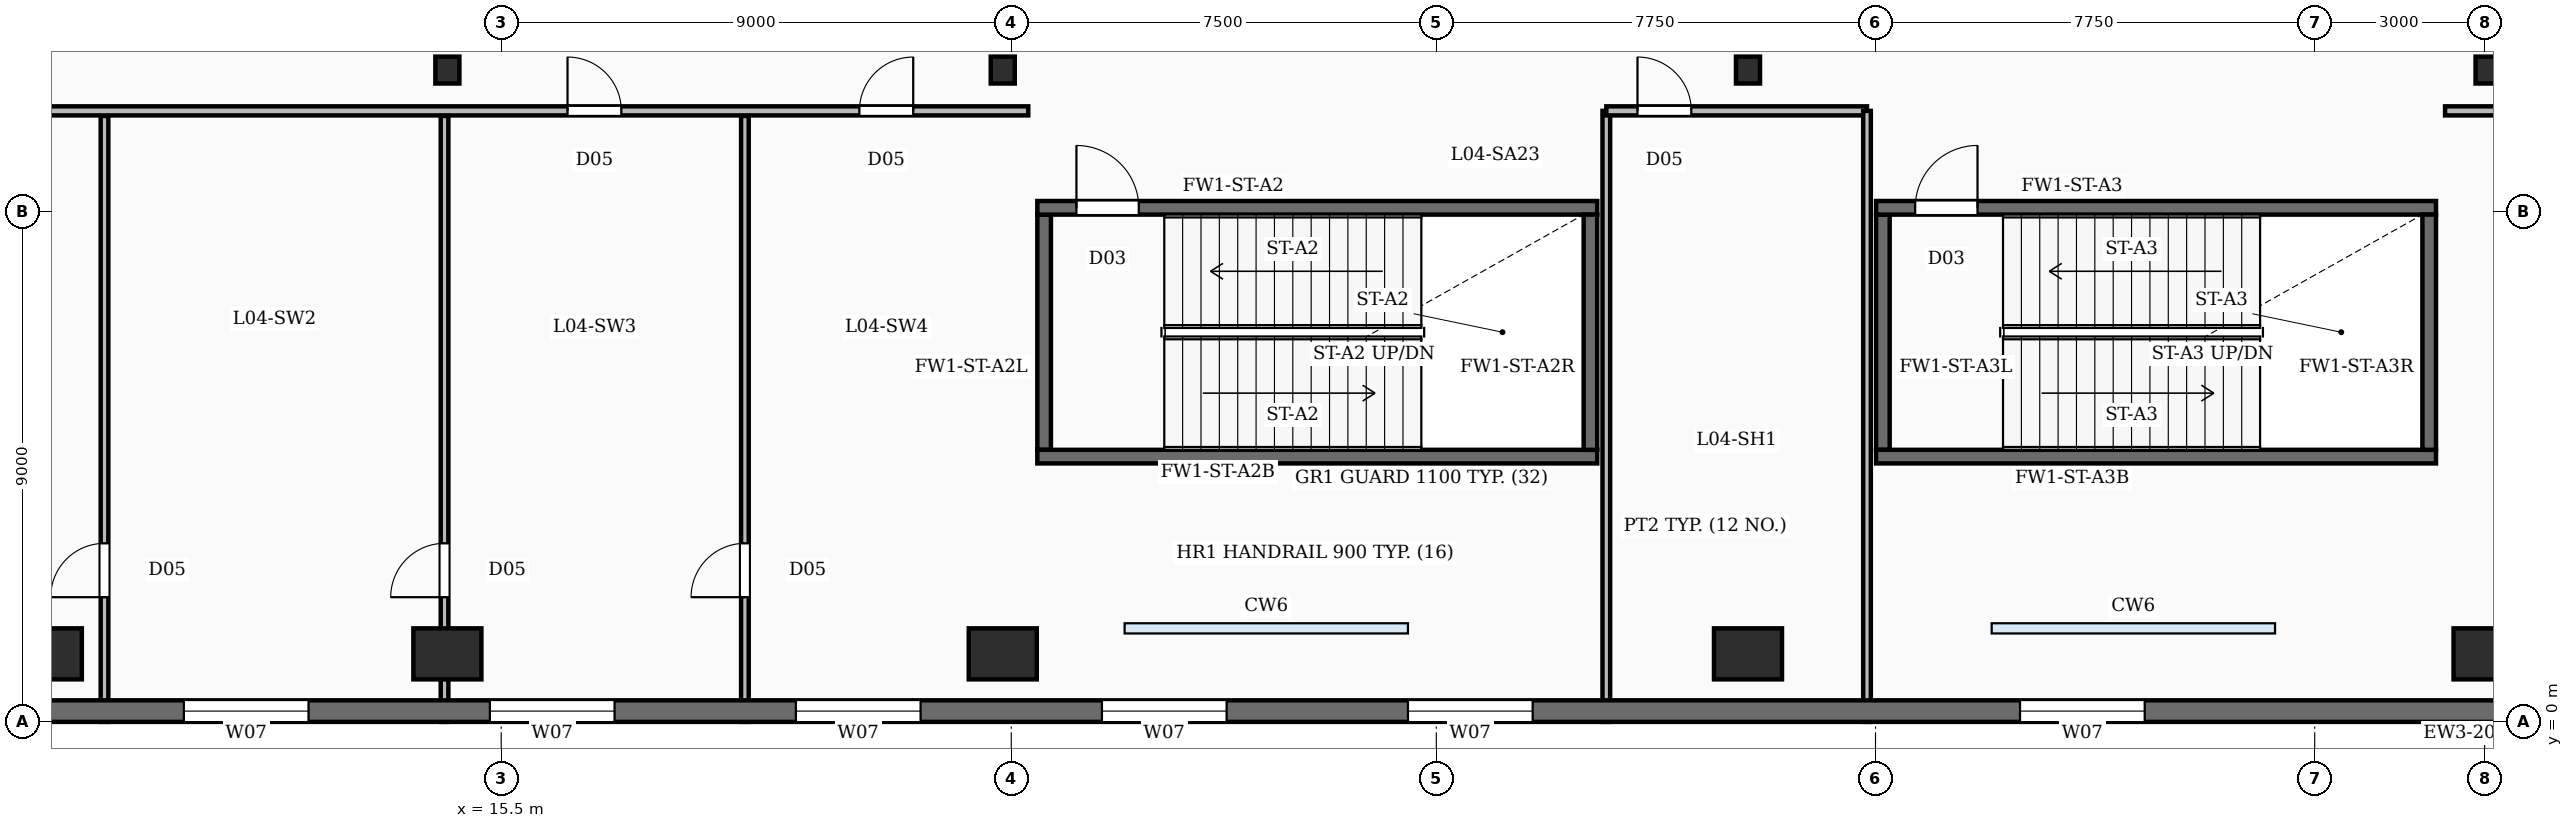
"""IFC4 building model, lengths in metres.
Left out: names, types, materials, properties, quantities, classifications, styles, units other than length and angle.
Written with IfcOpenShell. Run it as: python <this file> out.ifc"""

import sys

from ifc_helpers import new_model, si_unit, direction, frame, frame_2d, origin, origin_2d, place, context, subcontext, project, spatial, rectangle, i_section, extrude, element, fill, save


model = new_model("IFC4")
c1 = context("Model", 3, precision=1e-05, world=origin(), true_north=direction((0.0, 1.0)))
c2 = subcontext(c1, "Body", "Model", "MODEL_VIEW")
j1 = project(units=[si_unit("LENGTHUNIT", "METRE"), si_unit("PLANEANGLEUNIT", "RADIAN")], contexts=[c1])
p1 = place(None, origin())
s1 = spatial("IfcSite", under=j1, at=p1, CompositionType="ELEMENT")
p2 = place(p1, origin())
s2 = spatial("IfcBuilding", under=s1, at=p2, CompositionType="ELEMENT")
p3 = place(p2, frame((0.0, 0.0, 23.0)))
s3 = spatial("IfcBuildingStorey", under=s2, at=p3, CompositionType="ELEMENT", Elevation=23.0)
for number, where, z_axis, x_axis in (
    (1, (7.5, 1.2, -0.35), (0.0, 0.0, 1.0), (1.0, 0.0, 0.0)),
    (2, (14.55, 1.2, -0.35), (0.0, 0.0, 1.0), (1.0, 0.0, 0.0)),
    (3, (24.35, 1.2, -0.35), (0.0, 0.0, 1.0), (1.0, 0.0, 0.0)),
    (4, (37.5, 1.2, -0.35), (0.0, 0.0, 1.0), (1.0, 0.0, 0.0)),
    (5, (50.55, 1.2, -0.35), (0.0, 0.0, 1.0), (1.0, 0.0, 0.0)),
):
    element("IfcColumn", number, at=place(p3, frame(where, z_axis=z_axis, x_axis=x_axis)), inside=s3, PredefinedType="COLUMN", context=c2, shape_type="SweptSolid", body=[
        extrude(rectangle(XDim=1.2, YDim=0.9, at=origin_2d()), origin(), (0.0, 0.0, 1.0), 5.0),
    ])
for number, where, z_axis, x_axis in (
    (6, (14.55, 11.5, -0.35), (0.0, 0.0, 1.0), (1.0, 0.0, 0.0)),
    (7, (24.35, 11.5, -0.35), (0.0, 0.0, 1.0), (1.0, 0.0, 0.0)),
    (8, (37.5, 11.5, -0.35), (0.0, 0.0, 1.0), (1.0, 0.0, 0.0)),
    (9, (50.55, 11.5, -0.35), (0.0, 0.0, 1.0), (1.0, 0.0, 0.0)),
):
    element("IfcColumn", number, at=place(p3, frame(where, z_axis=z_axis, x_axis=x_axis)), inside=s3, PredefinedType="COLUMN", context=c2, shape_type="SweptSolid", body=[
        extrude(i_section(OverallWidth=0.424, OverallDepth=0.474, WebThickness=0.048, FlangeThickness=0.077, FilletRadius=0.02, at=origin_2d()), origin(), (0.0, 0.0, 1.0), 5.0),
    ])
p4 = place(p3, frame((74.1, 0.19, 0.0), z_axis=(0.0, 0.0, 1.0), x_axis=(-1.0, 0.0, 0.0)))
e10 = element("IfcWall", 10, at=p4, inside=s3, PredefinedType="SOLIDWALL", context=c2, shape_type="SweptSolid", body=[
    extrude(rectangle(XDim=68.7, YDim=0.38, at=frame_2d((34.35, 0.0))), origin(), (0.0, 0.0, 1.0), 4.65),
])
p5 = place(p4, frame((2.6, 0.0, 0.95)))
e11 = element("IfcOpeningElement", 11, at=p5, cuts=e10, PredefinedType="OPENING", context=c2, shape_type="SweptSolid", body=[
    extrude(rectangle(XDim=2.2, YDim=2.5, at=frame_2d((1.1, 1.25))), frame((0.0, 0.2, 0.0), z_axis=(0.0, -1.0, 0.0), x_axis=(1.0, 0.0, 0.0)), (0.0, 0.0, 1.0), 0.4),
])
p6 = place(p4, frame((29.6, 0.0, 0.95)))
e12 = element("IfcOpeningElement", 12, at=p6, cuts=e10, PredefinedType="OPENING", context=c2, shape_type="SweptSolid", body=[
    extrude(rectangle(XDim=2.2, YDim=2.5, at=frame_2d((1.1, 1.25))), frame((0.0, 0.2, 0.0), z_axis=(0.0, -1.0, 0.0), x_axis=(1.0, 0.0, 0.0)), (0.0, 0.0, 1.0), 0.4),
])
p7 = place(p4, frame((40.4, 0.0, 0.95)))
e13 = element("IfcOpeningElement", 13, at=p7, cuts=e10, PredefinedType="OPENING", context=c2, shape_type="SweptSolid", body=[
    extrude(rectangle(XDim=2.2, YDim=2.5, at=frame_2d((1.1, 1.25))), frame((0.0, 0.2, 0.0), z_axis=(0.0, -1.0, 0.0), x_axis=(1.0, 0.0, 0.0)), (0.0, 0.0, 1.0), 0.4),
])
p8 = place(p4, frame((45.8, 0.0, 0.95)))
e14 = element("IfcOpeningElement", 14, at=p8, cuts=e10, PredefinedType="OPENING", context=c2, shape_type="SweptSolid", body=[
    extrude(rectangle(XDim=2.2, YDim=2.5, at=frame_2d((1.1, 1.25))), frame((0.0, 0.2, 0.0), z_axis=(0.0, -1.0, 0.0), x_axis=(1.0, 0.0, 0.0)), (0.0, 0.0, 1.0), 0.4),
])
p9 = place(p4, frame((51.2, 0.0, 0.95)))
e15 = element("IfcOpeningElement", 15, at=p9, cuts=e10, PredefinedType="OPENING", context=c2, shape_type="SweptSolid", body=[
    extrude(rectangle(XDim=2.2, YDim=2.5, at=frame_2d((1.1, 1.25))), frame((0.0, 0.2, 0.0), z_axis=(0.0, -1.0, 0.0), x_axis=(1.0, 0.0, 0.0)), (0.0, 0.0, 1.0), 0.4),
])
p10 = place(p4, frame((56.6, 0.0, 0.95)))
e16 = element("IfcOpeningElement", 16, at=p10, cuts=e10, PredefinedType="OPENING", context=c2, shape_type="SweptSolid", body=[
    extrude(rectangle(XDim=2.2, YDim=2.5, at=frame_2d((1.1, 1.25))), frame((0.0, 0.2, 0.0), z_axis=(0.0, -1.0, 0.0), x_axis=(1.0, 0.0, 0.0)), (0.0, 0.0, 1.0), 0.4),
])
p11 = place(p4, frame((62.0, 0.0, 0.95)))
e17 = element("IfcOpeningElement", 17, at=p11, cuts=e10, PredefinedType="OPENING", context=c2, shape_type="SweptSolid", body=[
    extrude(rectangle(XDim=2.2, YDim=2.5, at=frame_2d((1.1, 1.25))), frame((0.0, 0.2, 0.0), z_axis=(0.0, -1.0, 0.0), x_axis=(1.0, 0.0, 0.0)), (0.0, 0.0, 1.0), 0.4),
])
p12 = place(p3, frame((24.96, 9.07, 0.0), z_axis=(0.0, 0.0, 1.0), x_axis=(1.0, 0.0, 0.0)))
e18 = element("IfcWall", 18, at=p12, inside=s3, PredefinedType="SOLIDWALL", context=c2, shape_type="SweptSolid", body=[
    extrude(rectangle(XDim=9.88, YDim=0.24, at=frame_2d((4.94, 0.0))), origin(), (0.0, 0.0, 1.0), 4.65),
])
p13 = place(p12, frame((0.69, 0.0, 0.0)))
e19 = element("IfcOpeningElement", 19, at=p13, cuts=e18, PredefinedType="OPENING", context=c2, shape_type="SweptSolid", body=[
    extrude(rectangle(XDim=1.1, YDim=2.15, at=frame_2d((0.55, 1.075))), frame((0.0, 0.13, 0.0), z_axis=(0.0, -1.0, 0.0), x_axis=(1.0, 0.0, 0.0)), (0.0, 0.0, 1.0), 0.26),
])
p14 = place(p3, frame((24.96, 4.68, 0.0), z_axis=(0.0, 0.0, 1.0), x_axis=(1.0, 0.0, 0.0)))
e20 = element("IfcWall", 20, at=p14, inside=s3, PredefinedType="SOLIDWALL", context=c2, shape_type="SweptSolid", body=[
    extrude(rectangle(XDim=9.88, YDim=0.24, at=frame_2d((4.94, 0.0))), origin(), (0.0, 0.0, 1.0), 4.65),
])
for number, where, z_axis, x_axis in (
    (21, (25.08, 4.8, 0.0), (0.0, 0.0, 1.0), (0.0, 1.0, 0.0)),
    (22, (34.72, 4.8, 0.0), (0.0, 0.0, 1.0), (0.0, 1.0, 0.0)),
):
    element("IfcWall", number, at=place(p3, frame(where, z_axis=z_axis, x_axis=x_axis)), inside=s3, PredefinedType="SOLIDWALL", context=c2, shape_type="SweptSolid", body=[
        extrude(rectangle(XDim=4.15, YDim=0.24, at=frame_2d((2.075, 0.0))), origin(), (0.0, 0.0, 1.0), 4.65),
    ])
p15 = place(p3, frame((39.76, 9.07, 0.0), z_axis=(0.0, 0.0, 1.0), x_axis=(1.0, 0.0, 0.0)))
e23 = element("IfcWall", 23, at=p15, inside=s3, PredefinedType="SOLIDWALL", context=c2, shape_type="SweptSolid", body=[
    extrude(rectangle(XDim=9.88, YDim=0.24, at=frame_2d((4.94, 0.0))), origin(), (0.0, 0.0, 1.0), 4.65),
])
p16 = place(p15, frame((0.69, 0.0, 0.0)))
e24 = element("IfcOpeningElement", 24, at=p16, cuts=e23, PredefinedType="OPENING", context=c2, shape_type="SweptSolid", body=[
    extrude(rectangle(XDim=1.1, YDim=2.15, at=frame_2d((0.55, 1.075))), frame((0.0, 0.13, 0.0), z_axis=(0.0, -1.0, 0.0), x_axis=(1.0, 0.0, 0.0)), (0.0, 0.0, 1.0), 0.26),
])
p17 = place(p3, frame((39.76, 4.68, 0.0), z_axis=(0.0, 0.0, 1.0), x_axis=(1.0, 0.0, 0.0)))
e25 = element("IfcWall", 25, at=p17, inside=s3, PredefinedType="SOLIDWALL", context=c2, shape_type="SweptSolid", body=[
    extrude(rectangle(XDim=9.88, YDim=0.24, at=frame_2d((4.94, 0.0))), origin(), (0.0, 0.0, 1.0), 4.65),
])
for number, where, z_axis, x_axis in (
    (26, (39.88, 4.8, 0.0), (0.0, 0.0, 1.0), (0.0, 1.0, 0.0)),
    (27, (49.52, 4.8, 0.0), (0.0, 0.0, 1.0), (0.0, 1.0, 0.0)),
):
    element("IfcWall", number, at=place(p3, frame(where, z_axis=z_axis, x_axis=x_axis)), inside=s3, PredefinedType="SOLIDWALL", context=c2, shape_type="SweptSolid", body=[
        extrude(rectangle(XDim=4.15, YDim=0.24, at=frame_2d((2.075, 0.0))), origin(), (0.0, 0.0, 1.0), 4.65),
    ])
p18 = place(p3, frame((8.5, 0.0, 0.0), z_axis=(0.0, 0.0, 1.0), x_axis=(0.0, 1.0, 0.0)))
e28 = element("IfcWall", 28, at=p18, inside=s3, PredefinedType="PARTITIONING", context=c2, shape_type="SweptSolid", body=[
    extrude(rectangle(XDim=10.69, YDim=0.135, at=frame_2d((5.345, 0.0))), origin(), (0.0, 0.0, 1.0), 3.71),
])
p19 = place(p18, frame((2.2, 0.0, 0.0)))
e29 = element("IfcOpeningElement", 29, at=p19, cuts=e28, PredefinedType="OPENING", context=c2, shape_type="SweptSolid", body=[
    extrude(rectangle(XDim=0.95, YDim=2.15, at=frame_2d((0.475, 1.075))), frame((0.0, 0.077, 0.0), z_axis=(0.0, -1.0, 0.0), x_axis=(1.0, 0.0, 0.0)), (0.0, 0.0, 1.0), 0.155),
])
p20 = place(p3, frame((14.5, 0.0, 0.0), z_axis=(0.0, 0.0, 1.0), x_axis=(0.0, 1.0, 0.0)))
e30 = element("IfcWall", 30, at=p20, inside=s3, PredefinedType="PARTITIONING", context=c2, shape_type="SweptSolid", body=[
    extrude(rectangle(XDim=10.69, YDim=0.135, at=frame_2d((5.345, 0.0))), origin(), (0.0, 0.0, 1.0), 3.71),
])
p21 = place(p20, frame((2.2, 0.0, 0.0)))
e31 = element("IfcOpeningElement", 31, at=p21, cuts=e30, PredefinedType="OPENING", context=c2, shape_type="SweptSolid", body=[
    extrude(rectangle(XDim=0.95, YDim=2.15, at=frame_2d((0.475, 1.075))), frame((0.0, 0.077, 0.0), z_axis=(0.0, -1.0, 0.0), x_axis=(1.0, 0.0, 0.0)), (0.0, 0.0, 1.0), 0.155),
])
p22 = place(p3, frame((19.8, 0.0, 0.0), z_axis=(0.0, 0.0, 1.0), x_axis=(0.0, 1.0, 0.0)))
e32 = element("IfcWall", 32, at=p22, inside=s3, PredefinedType="PARTITIONING", context=c2, shape_type="SweptSolid", body=[
    extrude(rectangle(XDim=10.69, YDim=0.135, at=frame_2d((5.345, 0.0))), origin(), (0.0, 0.0, 1.0), 3.71),
])
p23 = place(p22, frame((2.2, 0.0, 0.0)))
e33 = element("IfcOpeningElement", 33, at=p23, cuts=e32, PredefinedType="OPENING", context=c2, shape_type="SweptSolid", body=[
    extrude(rectangle(XDim=0.95, YDim=2.15, at=frame_2d((0.475, 1.075))), frame((0.0, 0.077, 0.0), z_axis=(0.0, -1.0, 0.0), x_axis=(1.0, 0.0, 0.0)), (0.0, 0.0, 1.0), 0.155),
])
p24 = place(p3, frame((0.0, 10.78, 0.0), z_axis=(0.0, 0.0, 1.0), x_axis=(1.0, 0.0, 0.0)))
e34 = element("IfcWall", 34, at=p24, inside=s3, PredefinedType="PARTITIONING", context=c2, shape_type="SweptSolid", body=[
    extrude(rectangle(XDim=24.8, YDim=0.16, at=frame_2d((12.4, 0.0))), origin(), (0.0, 0.0, 1.0), 3.71),
])
p25 = place(p24, frame((16.67, 0.0, 0.0)))
e35 = element("IfcOpeningElement", 35, at=p25, cuts=e34, PredefinedType="OPENING", context=c2, shape_type="SweptSolid", body=[
    extrude(rectangle(XDim=0.95, YDim=2.15, at=frame_2d((0.475, 1.075))), frame((0.0, 0.09, 0.0), z_axis=(0.0, -1.0, 0.0), x_axis=(1.0, 0.0, 0.0)), (0.0, 0.0, 1.0), 0.18),
])
p26 = place(p24, frame((21.82, 0.0, 0.0)))
e36 = element("IfcOpeningElement", 36, at=p26, cuts=e34, PredefinedType="OPENING", context=c2, shape_type="SweptSolid", body=[
    extrude(rectangle(XDim=0.95, YDim=2.15, at=frame_2d((0.475, 1.075))), frame((0.0, 0.09, 0.0), z_axis=(0.0, -1.0, 0.0), x_axis=(1.0, 0.0, 0.0)), (0.0, 0.0, 1.0), 0.18),
])
p27 = place(p3, frame((49.8, 10.78, 0.0), z_axis=(0.0, 0.0, 1.0), x_axis=(1.0, 0.0, 0.0)))
e37 = element("IfcWall", 37, at=p27, inside=s3, PredefinedType="PARTITIONING", context=c2, shape_type="SweptSolid", body=[
    extrude(rectangle(XDim=29.7, YDim=0.16, at=frame_2d((14.85, 0.0))), origin(), (0.0, 0.0, 1.0), 3.71),
])
p28 = place(p27, frame((2.37, 0.0, 0.0)))
e38 = element("IfcOpeningElement", 38, at=p28, cuts=e37, PredefinedType="OPENING", context=c2, shape_type="SweptSolid", body=[
    extrude(rectangle(XDim=0.95, YDim=2.15, at=frame_2d((0.475, 1.075))), frame((0.0, 0.09, 0.0), z_axis=(0.0, -1.0, 0.0), x_axis=(1.0, 0.0, 0.0)), (0.0, 0.0, 1.0), 0.18),
])
p29 = place(p27, frame((8.22, 0.0, 0.0)))
e39 = element("IfcOpeningElement", 39, at=p29, cuts=e37, PredefinedType="OPENING", context=c2, shape_type="SweptSolid", body=[
    extrude(rectangle(XDim=0.95, YDim=2.15, at=frame_2d((0.475, 1.075))), frame((0.0, 0.09, 0.0), z_axis=(0.0, -1.0, 0.0), x_axis=(1.0, 0.0, 0.0)), (0.0, 0.0, 1.0), 0.18),
])
p30 = place(p27, frame((14.22, 0.0, 0.0)))
e40 = element("IfcOpeningElement", 40, at=p30, cuts=e37, PredefinedType="OPENING", context=c2, shape_type="SweptSolid", body=[
    extrude(rectangle(XDim=0.95, YDim=2.15, at=frame_2d((0.475, 1.075))), frame((0.0, 0.09, 0.0), z_axis=(0.0, -1.0, 0.0), x_axis=(1.0, 0.0, 0.0)), (0.0, 0.0, 1.0), 0.18),
])
p31 = place(p27, frame((20.02, 0.0, 0.0)))
e41 = element("IfcOpeningElement", 41, at=p31, cuts=e37, PredefinedType="OPENING", context=c2, shape_type="SweptSolid", body=[
    extrude(rectangle(XDim=0.95, YDim=2.15, at=frame_2d((0.475, 1.075))), frame((0.0, 0.09, 0.0), z_axis=(0.0, -1.0, 0.0), x_axis=(1.0, 0.0, 0.0)), (0.0, 0.0, 1.0), 0.18),
])
p32 = place(p3, frame((35.0, 10.78, 0.0), z_axis=(0.0, 0.0, 1.0), x_axis=(1.0, 0.0, 0.0)))
e42 = element("IfcWall", 42, at=p32, inside=s3, PredefinedType="PARTITIONING", context=c2, shape_type="SweptSolid", body=[
    extrude(rectangle(XDim=4.6, YDim=0.16, at=frame_2d((2.3, 0.0))), origin(), (0.0, 0.0, 1.0), 3.71),
])
p33 = place(p32, frame((0.55, 0.0, 0.0)))
e43 = element("IfcOpeningElement", 43, at=p33, cuts=e42, PredefinedType="OPENING", context=c2, shape_type="SweptSolid", body=[
    extrude(rectangle(XDim=0.95, YDim=2.15, at=frame_2d((0.475, 1.075))), frame((0.0, 0.09, 0.0), z_axis=(0.0, -1.0, 0.0), x_axis=(1.0, 0.0, 0.0)), (0.0, 0.0, 1.0), 0.18),
])
for number, where, z_axis, x_axis in (
    (44, (35.0, 0.0, 0.0), (0.0, 0.0, 1.0), (0.0, 1.0, 0.0)),
    (45, (39.6, 0.0, 0.0), (0.0, 0.0, 1.0), (0.0, 1.0, 0.0)),
):
    element("IfcWall", number, at=place(p3, frame(where, z_axis=z_axis, x_axis=x_axis)), inside=s3, PredefinedType="PARTITIONING", context=c2, shape_type="SweptSolid", body=[
        extrude(rectangle(XDim=10.78, YDim=0.135, at=frame_2d((5.39, 0.0))), origin(), (0.0, 0.0, 1.0), 3.71),
    ])
p34 = place(p6, origin())
e46 = element("IfcWindow", 46, at=p34, inside=s3, PartitioningType="DOUBLE_PANEL_VERTICAL", PredefinedType="WINDOW", context=c2, shape_type="SweptSolid", body=[
    extrude(rectangle(XDim=2.2, YDim=2.5, at=frame_2d((1.1, 1.25))), frame((0.0, 0.03, 0.0), z_axis=(0.0, -1.0, 0.0), x_axis=(1.0, 0.0, 0.0)), (0.0, 0.0, 1.0), 0.06),
])
fill(e12, e46)
p35 = place(p7, origin())
e47 = element("IfcWindow", 47, at=p35, inside=s3, PartitioningType="DOUBLE_PANEL_VERTICAL", PredefinedType="WINDOW", context=c2, shape_type="SweptSolid", body=[
    extrude(rectangle(XDim=2.2, YDim=2.5, at=frame_2d((1.1, 1.25))), frame((0.0, 0.03, 0.0), z_axis=(0.0, -1.0, 0.0), x_axis=(1.0, 0.0, 0.0)), (0.0, 0.0, 1.0), 0.06),
])
fill(e13, e47)
p36 = place(p8, origin())
e48 = element("IfcWindow", 48, at=p36, inside=s3, PartitioningType="DOUBLE_PANEL_VERTICAL", PredefinedType="WINDOW", context=c2, shape_type="SweptSolid", body=[
    extrude(rectangle(XDim=2.2, YDim=2.5, at=frame_2d((1.1, 1.25))), frame((0.0, 0.03, 0.0), z_axis=(0.0, -1.0, 0.0), x_axis=(1.0, 0.0, 0.0)), (0.0, 0.0, 1.0), 0.06),
])
fill(e14, e48)
p37 = place(p9, origin())
e49 = element("IfcWindow", 49, at=p37, inside=s3, PartitioningType="DOUBLE_PANEL_VERTICAL", PredefinedType="WINDOW", context=c2, shape_type="SweptSolid", body=[
    extrude(rectangle(XDim=2.2, YDim=2.5, at=frame_2d((1.1, 1.25))), frame((0.0, 0.03, 0.0), z_axis=(0.0, -1.0, 0.0), x_axis=(1.0, 0.0, 0.0)), (0.0, 0.0, 1.0), 0.06),
])
fill(e15, e49)
p38 = place(p10, origin())
e50 = element("IfcWindow", 50, at=p38, inside=s3, PartitioningType="DOUBLE_PANEL_VERTICAL", PredefinedType="WINDOW", context=c2, shape_type="SweptSolid", body=[
    extrude(rectangle(XDim=2.2, YDim=2.5, at=frame_2d((1.1, 1.25))), frame((0.0, 0.03, 0.0), z_axis=(0.0, -1.0, 0.0), x_axis=(1.0, 0.0, 0.0)), (0.0, 0.0, 1.0), 0.06),
])
fill(e16, e50)
p39 = place(p11, origin())
e51 = element("IfcWindow", 51, at=p39, inside=s3, PartitioningType="DOUBLE_PANEL_VERTICAL", PredefinedType="WINDOW", context=c2, shape_type="SweptSolid", body=[
    extrude(rectangle(XDim=2.2, YDim=2.5, at=frame_2d((1.1, 1.25))), frame((0.0, 0.03, 0.0), z_axis=(0.0, -1.0, 0.0), x_axis=(1.0, 0.0, 0.0)), (0.0, 0.0, 1.0), 0.06),
])
fill(e17, e51)
p40 = place(p13, origin())
e52 = element("IfcDoor", 52, at=p40, inside=s3, OperationType="SINGLE_SWING_LEFT", PredefinedType="DOOR", context=c2, shape_type="SweptSolid", body=[
    extrude(rectangle(XDim=1.1, YDim=2.15, at=frame_2d((0.55, 1.075))), frame((0.0, 0.025, 0.0), z_axis=(0.0, -1.0, 0.0), x_axis=(1.0, 0.0, 0.0)), (0.0, 0.0, 1.0), 0.05),
])
fill(e19, e52)
p41 = place(p16, origin())
e53 = element("IfcDoor", 53, at=p41, inside=s3, OperationType="SINGLE_SWING_RIGHT", PredefinedType="DOOR", context=c2, shape_type="SweptSolid", body=[
    extrude(rectangle(XDim=1.1, YDim=2.15, at=frame_2d((0.55, 1.075))), frame((0.0, 0.025, 0.0), z_axis=(0.0, -1.0, 0.0), x_axis=(1.0, 0.0, 0.0)), (0.0, 0.0, 1.0), 0.05),
])
fill(e24, e53)
p42 = place(p19, origin())
e54 = element("IfcDoor", 54, at=p42, inside=s3, OperationType="SINGLE_SWING_LEFT", PredefinedType="DOOR", context=c2, shape_type="SweptSolid", body=[
    extrude(rectangle(XDim=0.95, YDim=2.15, at=frame_2d((0.475, 1.075))), frame((0.0, 0.025, 0.0), z_axis=(0.0, -1.0, 0.0), x_axis=(1.0, 0.0, 0.0)), (0.0, 0.0, 1.0), 0.05),
])
fill(e29, e54)
p43 = place(p21, origin())
e55 = element("IfcDoor", 55, at=p43, inside=s3, OperationType="SINGLE_SWING_LEFT", PredefinedType="DOOR", context=c2, shape_type="SweptSolid", body=[
    extrude(rectangle(XDim=0.95, YDim=2.15, at=frame_2d((0.475, 1.075))), frame((0.0, 0.025, 0.0), z_axis=(0.0, -1.0, 0.0), x_axis=(1.0, 0.0, 0.0)), (0.0, 0.0, 1.0), 0.05),
])
fill(e31, e55)
p44 = place(p23, origin())
e56 = element("IfcDoor", 56, at=p44, inside=s3, OperationType="SINGLE_SWING_LEFT", PredefinedType="DOOR", context=c2, shape_type="SweptSolid", body=[
    extrude(rectangle(XDim=0.95, YDim=2.15, at=frame_2d((0.475, 1.075))), frame((0.0, 0.025, 0.0), z_axis=(0.0, -1.0, 0.0), x_axis=(1.0, 0.0, 0.0)), (0.0, 0.0, 1.0), 0.05),
])
fill(e33, e56)
p45 = place(p25, origin())
e57 = element("IfcDoor", 57, at=p45, inside=s3, OperationType="SINGLE_SWING_LEFT", PredefinedType="DOOR", context=c2, shape_type="SweptSolid", body=[
    extrude(rectangle(XDim=0.95, YDim=2.15, at=frame_2d((0.475, 1.075))), frame((0.0, 0.025, 0.0), z_axis=(0.0, -1.0, 0.0), x_axis=(1.0, 0.0, 0.0)), (0.0, 0.0, 1.0), 0.05),
])
fill(e35, e57)
p46 = place(p26, origin())
e58 = element("IfcDoor", 58, at=p46, inside=s3, OperationType="SINGLE_SWING_RIGHT", PredefinedType="DOOR", context=c2, shape_type="SweptSolid", body=[
    extrude(rectangle(XDim=0.95, YDim=2.15, at=frame_2d((0.475, 1.075))), frame((0.0, 0.025, 0.0), z_axis=(0.0, -1.0, 0.0), x_axis=(1.0, 0.0, 0.0)), (0.0, 0.0, 1.0), 0.05),
])
fill(e36, e58)
p47 = place(p33, origin())
e59 = element("IfcDoor", 59, at=p47, inside=s3, OperationType="SINGLE_SWING_LEFT", PredefinedType="DOOR", context=c2, shape_type="SweptSolid", body=[
    extrude(rectangle(XDim=0.95, YDim=2.15, at=frame_2d((0.475, 1.075))), frame((0.0, 0.025, 0.0), z_axis=(0.0, -1.0, 0.0), x_axis=(1.0, 0.0, 0.0)), (0.0, 0.0, 1.0), 0.05),
])
fill(e43, e59)
save(model, sys.argv[1])
